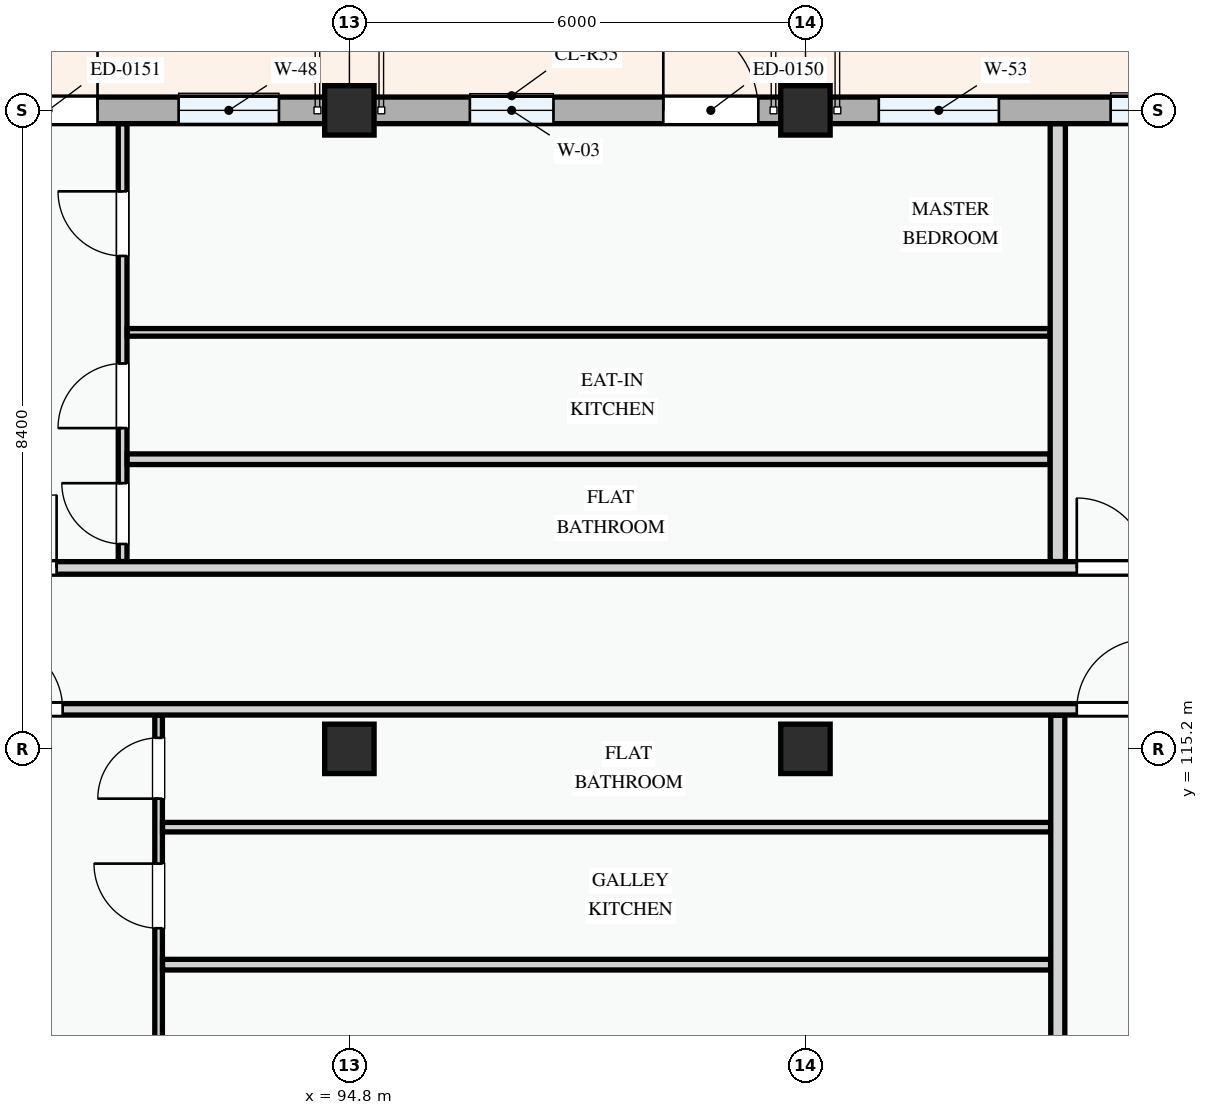
"""IFC4 building model, lengths in metres.
Left out: names, types, materials, properties, quantities, classifications, styles, units other than length and angle.
Written with IfcOpenShell. Run it as: python <this file> out.ifc"""

import sys

from ifc_helpers import new_model, si_unit, direction, frame, frame_2d, origin, origin_2d, place, context, subcontext, project, spatial, rectangle, extrude, element, fill, save


model = new_model("IFC4")
c1 = context("Model", 3, precision=1e-05, world=origin(), true_north=direction((0.0, 1.0)))
c2 = subcontext(c1, "Body", "Model", "MODEL_VIEW")
j1 = project(units=[si_unit("LENGTHUNIT", "METRE"), si_unit("PLANEANGLEUNIT", "RADIAN")], contexts=[c1])
p1 = place(None, origin())
s1 = spatial("IfcSite", under=j1, at=p1, CompositionType="ELEMENT")
p2 = place(p1, origin())
s2 = spatial("IfcBuilding", under=s1, at=p2, CompositionType="ELEMENT")
p3 = place(p2, frame((0.0, 0.0, 11.4)))
s3 = spatial("IfcBuildingStorey", under=s2, at=p3, CompositionType="ELEMENT", Elevation=11.4)
for number, where, z_axis, x_axis in (
    (1, (94.8, 115.2, 0.0), (0.0, 0.0, 1.0), (1.0, 0.0, 0.0)),
    (2, (94.8, 123.6, 0.0), (0.0, 0.0, 1.0), (1.0, 0.0, 0.0)),
    (3, (100.8, 115.2, 0.0), (0.0, 0.0, 1.0), (1.0, 0.0, 0.0)),
    (4, (100.8, 123.6, 0.0), (0.0, 0.0, 1.0), (1.0, 0.0, 0.0)),
):
    element("IfcColumn", number, at=place(p3, frame(where, z_axis=z_axis, x_axis=x_axis)), inside=s3, PredefinedType="COLUMN", context=c2, shape_type="SweptSolid", body=[
        extrude(rectangle(XDim=0.65, YDim=0.65, at=origin_2d()), origin(), (0.0, 0.0, 1.0), 3.3),
    ])
p4 = place(p3, frame((109.2, 123.6, 0.0), z_axis=(0.0, 0.0, 1.0), x_axis=(-1.0, 0.0, 0.0)))
e5 = element("IfcWall", 5, at=p4, inside=s3, PredefinedType="STANDARD", context=c2, shape_type="SweptSolid", body=[
    extrude(rectangle(XDim=8.4, YDim=0.35, at=frame_2d((4.2, 0.0))), origin(), (0.0, 0.0, 1.0), 2.375),
])
p5 = place(p4, frame((0.62, 0.0, 0.0)))
e6 = element("IfcOpeningElement", 6, at=p5, cuts=e5, PredefinedType="OPENING", context=c2, shape_type="SweptSolid", body=[
    extrude(rectangle(XDim=1.2, YDim=2.15, at=frame_2d((0.6, 1.075))), frame((0.0, 0.185, 0.0), z_axis=(0.0, -1.0, 0.0), x_axis=(1.0, 0.0, 0.0)), (0.0, 0.0, 1.0), 0.37),
])
p6 = place(p4, frame((2.565, 0.0, 0.78)))
e7 = element("IfcOpeningElement", 7, at=p6, cuts=e5, PredefinedType="OPENING", context=c2, shape_type="SweptSolid", body=[
    extrude(rectangle(XDim=1.82, YDim=1.46, at=frame_2d((0.91, 0.73))), frame((0.0, 0.185, 0.0), z_axis=(0.0, -1.0, 0.0), x_axis=(1.0, 0.0, 0.0)), (0.0, 0.0, 1.0), 0.37),
])
p7 = place(p4, frame((5.855, 0.0, 0.78)))
e8 = element("IfcOpeningElement", 8, at=p7, cuts=e5, PredefinedType="OPENING", context=c2, shape_type="SweptSolid", body=[
    extrude(rectangle(XDim=1.58, YDim=1.48, at=frame_2d((0.79, 0.74))), frame((0.0, 0.185, 0.0), z_axis=(0.0, -1.0, 0.0), x_axis=(1.0, 0.0, 0.0)), (0.0, 0.0, 1.0), 0.37),
])
p8 = place(p3, frame((100.8, 123.6, 0.0), z_axis=(0.0, 0.0, 1.0), x_axis=(-1.0, 0.0, 0.0)))
e9 = element("IfcWall", 9, at=p8, inside=s3, PredefinedType="STANDARD", context=c2, shape_type="SweptSolid", body=[
    extrude(rectangle(XDim=6.0, YDim=0.35, at=frame_2d((3.0, 0.0))), origin(), (0.0, 0.0, 1.0), 2.475),
])
p9 = place(p8, frame((0.62, 0.0, 0.0)))
e10 = element("IfcOpeningElement", 10, at=p9, cuts=e9, PredefinedType="OPENING", context=c2, shape_type="SweptSolid", body=[
    extrude(rectangle(XDim=1.25, YDim=2.2, at=frame_2d((0.625, 1.1))), frame((0.0, 0.185, 0.0), z_axis=(0.0, -1.0, 0.0), x_axis=(1.0, 0.0, 0.0)), (0.0, 0.0, 1.0), 0.37),
])
p10 = place(p8, frame((3.315, 0.0, 0.78)))
e11 = element("IfcOpeningElement", 11, at=p10, cuts=e9, PredefinedType="OPENING", context=c2, shape_type="SweptSolid", body=[
    extrude(rectangle(XDim=1.1, YDim=1.3, at=frame_2d((0.55, 0.65))), frame((0.0, 0.185, 0.0), z_axis=(0.0, -1.0, 0.0), x_axis=(1.0, 0.0, 0.0)), (0.0, 0.0, 1.0), 0.37),
])
p11 = place(p3, frame((94.8, 123.6, 0.0), z_axis=(0.0, 0.0, 1.0), x_axis=(-1.0, 0.0, 0.0)))
e12 = element("IfcWall", 12, at=p11, inside=s3, PredefinedType="STANDARD", context=c2, shape_type="SweptSolid", body=[
    extrude(rectangle(XDim=8.4, YDim=0.35, at=frame_2d((4.2, 0.0))), origin(), (0.0, 0.0, 1.0), 2.375),
])
p12 = place(p11, frame((3.313, 0.0, 0.0)))
e13 = element("IfcOpeningElement", 13, at=p12, cuts=e12, PredefinedType="OPENING", context=c2, shape_type="SweptSolid", body=[
    extrude(rectangle(XDim=1.3, YDim=2.15, at=frame_2d((0.65, 1.075))), frame((0.0, 0.185, 0.0), z_axis=(0.0, -1.0, 0.0), x_axis=(1.0, 0.0, 0.0)), (0.0, 0.0, 1.0), 0.37),
])
p13 = place(p11, frame((0.927, 0.0, 0.78)))
e14 = element("IfcOpeningElement", 14, at=p13, cuts=e12, PredefinedType="OPENING", context=c2, shape_type="SweptSolid", body=[
    extrude(rectangle(XDim=1.32, YDim=1.35, at=frame_2d((0.66, 0.675))), frame((0.0, 0.185, 0.0), z_axis=(0.0, -1.0, 0.0), x_axis=(1.0, 0.0, 0.0)), (0.0, 0.0, 1.0), 0.37),
])
p14 = place(p11, frame((5.417, 0.0, 0.78)))
e15 = element("IfcOpeningElement", 15, at=p14, cuts=e12, PredefinedType="OPENING", context=c2, shape_type="SweptSolid", body=[
    extrude(rectangle(XDim=2.04, YDim=1.46, at=frame_2d((1.02, 0.73))), frame((0.0, 0.185, 0.0), z_axis=(0.0, -1.0, 0.0), x_axis=(1.0, 0.0, 0.0)), (0.0, 0.0, 1.0), 0.37),
])
p15 = place(p3, frame((92.29, 109.26, 0.0), z_axis=(0.0, 0.0, 1.0), x_axis=(0.0, 1.0, 0.0)))
e16 = element("IfcWall", 16, at=p15, inside=s3, PredefinedType="PARTITIONING", context=c2, shape_type="SweptSolid", body=[
    extrude(rectangle(XDim=6.383, YDim=0.1, at=frame_2d((3.191, 0.0))), origin(), (0.0, 0.0, 1.0), 3.0),
])
p16 = place(p15, frame((1.125, 0.0, 0.0)))
e17 = element("IfcOpeningElement", 17, at=p16, cuts=e16, PredefinedType="OPENING", context=c2, shape_type="SweptSolid", body=[
    extrude(rectangle(XDim=0.85, YDim=2.1, at=frame_2d((0.425, 1.05))), frame((0.0, 0.06, 0.0), z_axis=(0.0, -1.0, 0.0), x_axis=(1.0, 0.0, 0.0)), (0.0, 0.0, 1.0), 0.12),
])
p17 = place(p15, frame((3.58, 0.0, 0.0)))
e18 = element("IfcOpeningElement", 18, at=p17, cuts=e16, PredefinedType="OPENING", context=c2, shape_type="SweptSolid", body=[
    extrude(rectangle(XDim=0.85, YDim=2.1, at=frame_2d((0.425, 1.05))), frame((0.0, 0.06, 0.0), z_axis=(0.0, -1.0, 0.0), x_axis=(1.0, 0.0, 0.0)), (0.0, 0.0, 1.0), 0.12),
])
p18 = place(p15, frame((5.285, 0.0, 0.0)))
e19 = element("IfcOpeningElement", 19, at=p18, cuts=e16, PredefinedType="OPENING", context=c2, shape_type="SweptSolid", body=[
    extrude(rectangle(XDim=0.8, YDim=2.1, at=frame_2d((0.4, 1.05))), frame((0.0, 0.06, 0.0), z_axis=(0.0, -1.0, 0.0), x_axis=(1.0, 0.0, 0.0)), (0.0, 0.0, 1.0), 0.12),
])
p19 = place(p3, frame((92.342, 112.361, 0.0), z_axis=(0.0, 0.0, 1.0), x_axis=(1.0, 0.0, 0.0)))
e20 = element("IfcWall", 20, at=p19, inside=s3, PredefinedType="PARTITIONING", context=c2, shape_type="SweptSolid", body=[
    extrude(rectangle(XDim=11.683, YDim=0.14, at=frame_2d((5.842, 0.0))), origin(), (0.0, 0.0, 1.0), 3.0),
])
p20 = place(p3, frame((92.342, 114.17, 0.0), z_axis=(0.0, 0.0, 1.0), x_axis=(1.0, 0.0, 0.0)))
e21 = element("IfcWall", 21, at=p20, inside=s3, PredefinedType="PARTITIONING", context=c2, shape_type="SweptSolid", body=[
    extrude(rectangle(XDim=11.683, YDim=0.125, at=frame_2d((5.842, 0.0))), origin(), (0.0, 0.0, 1.0), 3.0),
])
p21 = place(p3, frame((91.817, 117.665, 0.0), z_axis=(0.0, 0.0, 1.0), x_axis=(0.0, 1.0, 0.0)))
e22 = element("IfcWall", 22, at=p21, inside=s3, PredefinedType="PARTITIONING", context=c2, shape_type="SweptSolid", body=[
    extrude(rectangle(XDim=5.759, YDim=0.115, at=frame_2d((2.879, 0.0))), origin(), (0.0, 0.0, 1.0), 3.0),
])
p22 = place(p21, frame((0.231, 0.0, 0.0)))
e23 = element("IfcOpeningElement", 23, at=p22, cuts=e22, PredefinedType="OPENING", context=c2, shape_type="SweptSolid", body=[
    extrude(rectangle(XDim=0.8, YDim=2.1, at=frame_2d((0.4, 1.05))), frame((0.0, 0.067, 0.0), z_axis=(0.0, -1.0, 0.0), x_axis=(1.0, 0.0, 0.0)), (0.0, 0.0, 1.0), 0.135),
])
p23 = place(p21, frame((1.755, 0.0, 0.0)))
e24 = element("IfcOpeningElement", 24, at=p23, cuts=e22, PredefinedType="OPENING", context=c2, shape_type="SweptSolid", body=[
    extrude(rectangle(XDim=0.85, YDim=2.1, at=frame_2d((0.425, 1.05))), frame((0.0, 0.067, 0.0), z_axis=(0.0, -1.0, 0.0), x_axis=(1.0, 0.0, 0.0)), (0.0, 0.0, 1.0), 0.135),
])
p24 = place(p21, frame((4.02, 0.0, 0.0)))
e25 = element("IfcOpeningElement", 25, at=p24, cuts=e22, PredefinedType="OPENING", context=c2, shape_type="SweptSolid", body=[
    extrude(rectangle(XDim=0.85, YDim=2.1, at=frame_2d((0.425, 1.05))), frame((0.0, 0.067, 0.0), z_axis=(0.0, -1.0, 0.0), x_axis=(1.0, 0.0, 0.0)), (0.0, 0.0, 1.0), 0.135),
])
p25 = place(p3, frame((91.876, 120.679, 0.0), z_axis=(0.0, 0.0, 1.0), x_axis=(1.0, 0.0, 0.0)))
e26 = element("IfcWall", 26, at=p25, inside=s3, PredefinedType="PARTITIONING", context=c2, shape_type="SweptSolid", body=[
    extrude(rectangle(XDim=12.142, YDim=0.1, at=frame_2d((6.071, 0.0))), origin(), (0.0, 0.0, 1.0), 3.0),
])
p26 = place(p3, frame((91.876, 119.01, 0.0), z_axis=(0.0, 0.0, 1.0), x_axis=(1.0, 0.0, 0.0)))
e27 = element("IfcWall", 27, at=p26, inside=s3, PredefinedType="PARTITIONING", context=c2, shape_type="SweptSolid", body=[
    extrude(rectangle(XDim=12.142, YDim=0.14, at=frame_2d((6.071, 0.0))), origin(), (0.0, 0.0, 1.0), 3.0),
])
p27 = place(p3, frame((104.12, 109.377, 0.0), z_axis=(0.0, 0.0, 1.0), x_axis=(0.0, 1.0, 0.0)))
e28 = element("IfcWall", 28, at=p27, inside=s3, PredefinedType="PARTITIONING", context=c2, shape_type="SweptSolid", body=[
    extrude(rectangle(XDim=6.266, YDim=0.185, at=frame_2d((3.133, 0.0))), origin(), (0.0, 0.0, 1.0), 3.0),
])
p28 = place(p3, frame((104.12, 117.665, 0.0), z_axis=(0.0, 0.0, 1.0), x_axis=(0.0, 1.0, 0.0)))
e29 = element("IfcWall", 29, at=p28, inside=s3, PredefinedType="PARTITIONING", context=c2, shape_type="SweptSolid", body=[
    extrude(rectangle(XDim=5.759, YDim=0.2, at=frame_2d((2.879, 0.0))), origin(), (0.0, 0.0, 1.0), 3.0),
])
p29 = place(p3, frame((80.577, 115.72, 0.0), z_axis=(0.0, 0.0, 1.0), x_axis=(1.0, 0.0, 0.0)))
e30 = element("IfcWall", 30, at=p29, inside=s3, PredefinedType="PARTITIONING", context=c2, shape_type="SweptSolid", body=[
    extrude(rectangle(XDim=69.473, YDim=0.15, at=frame_2d((34.737, 0.0))), origin(), (0.0, 0.0, 1.0), 3.0),
])
p30 = place(p29, frame((9.531, 0.0, 0.0)))
e31 = element("IfcOpeningElement", 31, at=p30, cuts=e30, PredefinedType="OPENING", context=c2, shape_type="SweptSolid", body=[
    extrude(rectangle(XDim=0.92, YDim=2.1, at=frame_2d((0.46, 1.05))), frame((0.0, 0.085, 0.0), z_axis=(0.0, -1.0, 0.0), x_axis=(1.0, 0.0, 0.0)), (0.0, 0.0, 1.0), 0.17),
])
p31 = place(p29, frame((23.793, 0.0, 0.0)))
e32 = element("IfcOpeningElement", 32, at=p31, cuts=e30, PredefinedType="OPENING", context=c2, shape_type="SweptSolid", body=[
    extrude(rectangle(XDim=0.92, YDim=2.1, at=frame_2d((0.46, 1.05))), frame((0.0, 0.085, 0.0), z_axis=(0.0, -1.0, 0.0), x_axis=(1.0, 0.0, 0.0)), (0.0, 0.0, 1.0), 0.17),
])
p32 = place(p29, frame((52.74, 0.0, 0.0)))
e33 = element("IfcOpeningElement", 33, at=p32, cuts=e30, PredefinedType="OPENING", context=c2, shape_type="SweptSolid", body=[
    extrude(rectangle(XDim=0.92, YDim=2.1, at=frame_2d((0.46, 1.05))), frame((0.0, 0.085, 0.0), z_axis=(0.0, -1.0, 0.0), x_axis=(1.0, 0.0, 0.0)), (0.0, 0.0, 1.0), 0.17),
])
p33 = place(p3, frame((80.577, 117.58, 0.0), z_axis=(0.0, 0.0, 1.0), x_axis=(1.0, 0.0, 0.0)))
e34 = element("IfcWall", 34, at=p33, inside=s3, PredefinedType="PARTITIONING", context=c2, shape_type="SweptSolid", body=[
    extrude(rectangle(XDim=71.963, YDim=0.165, at=frame_2d((35.981, 0.0))), origin(), (0.0, 0.0, 1.0), 3.0),
])
p34 = place(p33, frame((9.411, 0.0, 0.0)))
e35 = element("IfcOpeningElement", 35, at=p34, cuts=e34, PredefinedType="OPENING", context=c2, shape_type="SweptSolid", body=[
    extrude(rectangle(XDim=0.96, YDim=2.12, at=frame_2d((0.48, 1.06))), frame((0.0, 0.093, 0.0), z_axis=(0.0, -1.0, 0.0), x_axis=(1.0, 0.0, 0.0)), (0.0, 0.0, 1.0), 0.185),
])
p35 = place(p33, frame((23.793, 0.0, 0.0)))
e36 = element("IfcOpeningElement", 36, at=p35, cuts=e34, PredefinedType="OPENING", context=c2, shape_type="SweptSolid", body=[
    extrude(rectangle(XDim=0.92, YDim=2.1, at=frame_2d((0.46, 1.05))), frame((0.0, 0.093, 0.0), z_axis=(0.0, -1.0, 0.0), x_axis=(1.0, 0.0, 0.0)), (0.0, 0.0, 1.0), 0.185),
])
p36 = place(p33, frame((52.718, 0.0, 0.0)))
e37 = element("IfcOpeningElement", 37, at=p36, cuts=e34, PredefinedType="OPENING", context=c2, shape_type="SweptSolid", body=[
    extrude(rectangle(XDim=0.92, YDim=2.1, at=frame_2d((0.46, 1.05))), frame((0.0, 0.093, 0.0), z_axis=(0.0, -1.0, 0.0), x_axis=(1.0, 0.0, 0.0)), (0.0, 0.0, 1.0), 0.185),
])
p37 = place(p6, origin())
e38 = element("IfcWindow", 38, at=p37, inside=s3, PartitioningType="DOUBLE_PANEL_VERTICAL", PredefinedType="WINDOW", context=c2, shape_type="SweptSolid", body=[
    extrude(rectangle(XDim=1.82, YDim=1.46, at=frame_2d((0.91, 0.73))), frame((0.0, 0.03, 0.0), z_axis=(0.0, -1.0, 0.0), x_axis=(1.0, 0.0, 0.0)), (0.0, 0.0, 1.0), 0.06),
])
fill(e7, e38)
p38 = place(p7, origin())
e39 = element("IfcWindow", 39, at=p38, inside=s3, PartitioningType="SINGLE_PANEL", PredefinedType="WINDOW", context=c2, shape_type="SweptSolid", body=[
    extrude(rectangle(XDim=1.58, YDim=1.48, at=frame_2d((0.79, 0.74))), frame((0.0, 0.03, 0.0), z_axis=(0.0, -1.0, 0.0), x_axis=(1.0, 0.0, 0.0)), (0.0, 0.0, 1.0), 0.06),
])
fill(e8, e39)
p39 = place(p9, frame((1.25, 0.0, 0.0), z_axis=(0.0, 0.0, 1.0), x_axis=(-1.0, 0.0, 0.0)))
e40 = element("IfcDoor", 40, at=p39, inside=s3, OperationType="SINGLE_SWING_LEFT", PredefinedType="DOOR", context=c2, shape_type="SweptSolid", body=[
    extrude(rectangle(XDim=1.25, YDim=2.2, at=frame_2d((0.625, 1.1))), frame((0.0, 0.025, 0.0), z_axis=(0.0, -1.0, 0.0), x_axis=(1.0, 0.0, 0.0)), (0.0, 0.0, 1.0), 0.05),
])
fill(e10, e40)
p40 = place(p10, origin())
e41 = element("IfcWindow", 41, at=p40, inside=s3, PartitioningType="SINGLE_PANEL", PredefinedType="WINDOW", context=c2, shape_type="SweptSolid", body=[
    extrude(rectangle(XDim=1.1, YDim=1.3, at=frame_2d((0.55, 0.65))), frame((0.0, 0.03, 0.0), z_axis=(0.0, -1.0, 0.0), x_axis=(1.0, 0.0, 0.0)), (0.0, 0.0, 1.0), 0.06),
])
fill(e11, e41)
p41 = place(p12, frame((1.3, 0.0, 0.0), z_axis=(0.0, 0.0, 1.0), x_axis=(-1.0, 0.0, 0.0)))
e42 = element("IfcDoor", 42, at=p41, inside=s3, OperationType="SINGLE_SWING_RIGHT", PredefinedType="DOOR", context=c2, shape_type="SweptSolid", body=[
    extrude(rectangle(XDim=1.3, YDim=2.15, at=frame_2d((0.65, 1.075))), frame((0.0, 0.025, 0.0), z_axis=(0.0, -1.0, 0.0), x_axis=(1.0, 0.0, 0.0)), (0.0, 0.0, 1.0), 0.05),
])
fill(e13, e42)
p42 = place(p13, origin())
e43 = element("IfcWindow", 43, at=p42, inside=s3, PartitioningType="SINGLE_PANEL", PredefinedType="WINDOW", context=c2, shape_type="SweptSolid", body=[
    extrude(rectangle(XDim=1.32, YDim=1.35, at=frame_2d((0.66, 0.675))), frame((0.0, 0.03, 0.0), z_axis=(0.0, -1.0, 0.0), x_axis=(1.0, 0.0, 0.0)), (0.0, 0.0, 1.0), 0.06),
])
fill(e14, e43)
p43 = place(p17, origin())
e44 = element("IfcDoor", 44, at=p43, inside=s3, OperationType="SINGLE_SWING_RIGHT", PredefinedType="DOOR", context=c2, shape_type="SweptSolid", body=[
    extrude(rectangle(XDim=0.85, YDim=2.1, at=frame_2d((0.425, 1.05))), frame((0.0, 0.025, 0.0), z_axis=(0.0, -1.0, 0.0), x_axis=(1.0, 0.0, 0.0)), (0.0, 0.0, 1.0), 0.05),
])
fill(e18, e44)
p44 = place(p18, origin())
e45 = element("IfcDoor", 45, at=p44, inside=s3, OperationType="SINGLE_SWING_LEFT", PredefinedType="DOOR", context=c2, shape_type="SweptSolid", body=[
    extrude(rectangle(XDim=0.8, YDim=2.1, at=frame_2d((0.4, 1.05))), frame((0.0, 0.025, 0.0), z_axis=(0.0, -1.0, 0.0), x_axis=(1.0, 0.0, 0.0)), (0.0, 0.0, 1.0), 0.05),
])
fill(e19, e45)
p45 = place(p22, origin())
e46 = element("IfcDoor", 46, at=p45, inside=s3, OperationType="SINGLE_SWING_RIGHT", PredefinedType="DOOR", context=c2, shape_type="SweptSolid", body=[
    extrude(rectangle(XDim=0.8, YDim=2.1, at=frame_2d((0.4, 1.05))), frame((0.0, 0.025, 0.0), z_axis=(0.0, -1.0, 0.0), x_axis=(1.0, 0.0, 0.0)), (0.0, 0.0, 1.0), 0.05),
])
fill(e23, e46)
p46 = place(p23, origin())
e47 = element("IfcDoor", 47, at=p46, inside=s3, OperationType="SINGLE_SWING_LEFT", PredefinedType="DOOR", context=c2, shape_type="SweptSolid", body=[
    extrude(rectangle(XDim=0.85, YDim=2.1, at=frame_2d((0.425, 1.05))), frame((0.0, 0.025, 0.0), z_axis=(0.0, -1.0, 0.0), x_axis=(1.0, 0.0, 0.0)), (0.0, 0.0, 1.0), 0.05),
])
fill(e24, e47)
p47 = place(p24, origin())
e48 = element("IfcDoor", 48, at=p47, inside=s3, OperationType="SINGLE_SWING_RIGHT", PredefinedType="DOOR", context=c2, shape_type="SweptSolid", body=[
    extrude(rectangle(XDim=0.85, YDim=2.1, at=frame_2d((0.425, 1.05))), frame((0.0, 0.025, 0.0), z_axis=(0.0, -1.0, 0.0), x_axis=(1.0, 0.0, 0.0)), (0.0, 0.0, 1.0), 0.05),
])
fill(e25, e48)
p48 = place(p30, origin())
e49 = element("IfcDoor", 49, at=p48, inside=s3, OperationType="SINGLE_SWING_LEFT", PredefinedType="DOOR", context=c2, shape_type="SweptSolid", body=[
    extrude(rectangle(XDim=0.92, YDim=2.1, at=frame_2d((0.46, 1.05))), frame((0.0, 0.025, 0.0), z_axis=(0.0, -1.0, 0.0), x_axis=(1.0, 0.0, 0.0)), (0.0, 0.0, 1.0), 0.05),
])
fill(e31, e49)
p49 = place(p31, origin())
e50 = element("IfcDoor", 50, at=p49, inside=s3, OperationType="SINGLE_SWING_RIGHT", PredefinedType="DOOR", context=c2, shape_type="SweptSolid", body=[
    extrude(rectangle(XDim=0.92, YDim=2.1, at=frame_2d((0.46, 1.05))), frame((0.0, 0.025, 0.0), z_axis=(0.0, -1.0, 0.0), x_axis=(1.0, 0.0, 0.0)), (0.0, 0.0, 1.0), 0.05),
])
fill(e32, e50)
p50 = place(p34, origin())
e51 = element("IfcDoor", 51, at=p50, inside=s3, OperationType="SINGLE_SWING_RIGHT", PredefinedType="DOOR", context=c2, shape_type="SweptSolid", body=[
    extrude(rectangle(XDim=0.96, YDim=2.12, at=frame_2d((0.48, 1.06))), frame((0.0, 0.025, 0.0), z_axis=(0.0, -1.0, 0.0), x_axis=(1.0, 0.0, 0.0)), (0.0, 0.0, 1.0), 0.05),
])
fill(e35, e51)
p51 = place(p35, origin())
e52 = element("IfcDoor", 52, at=p51, inside=s3, OperationType="SINGLE_SWING_LEFT", PredefinedType="DOOR", context=c2, shape_type="SweptSolid", body=[
    extrude(rectangle(XDim=0.92, YDim=2.1, at=frame_2d((0.46, 1.05))), frame((0.0, 0.025, 0.0), z_axis=(0.0, -1.0, 0.0), x_axis=(1.0, 0.0, 0.0)), (0.0, 0.0, 1.0), 0.05),
])
fill(e36, e52)
save(model, sys.argv[1])
